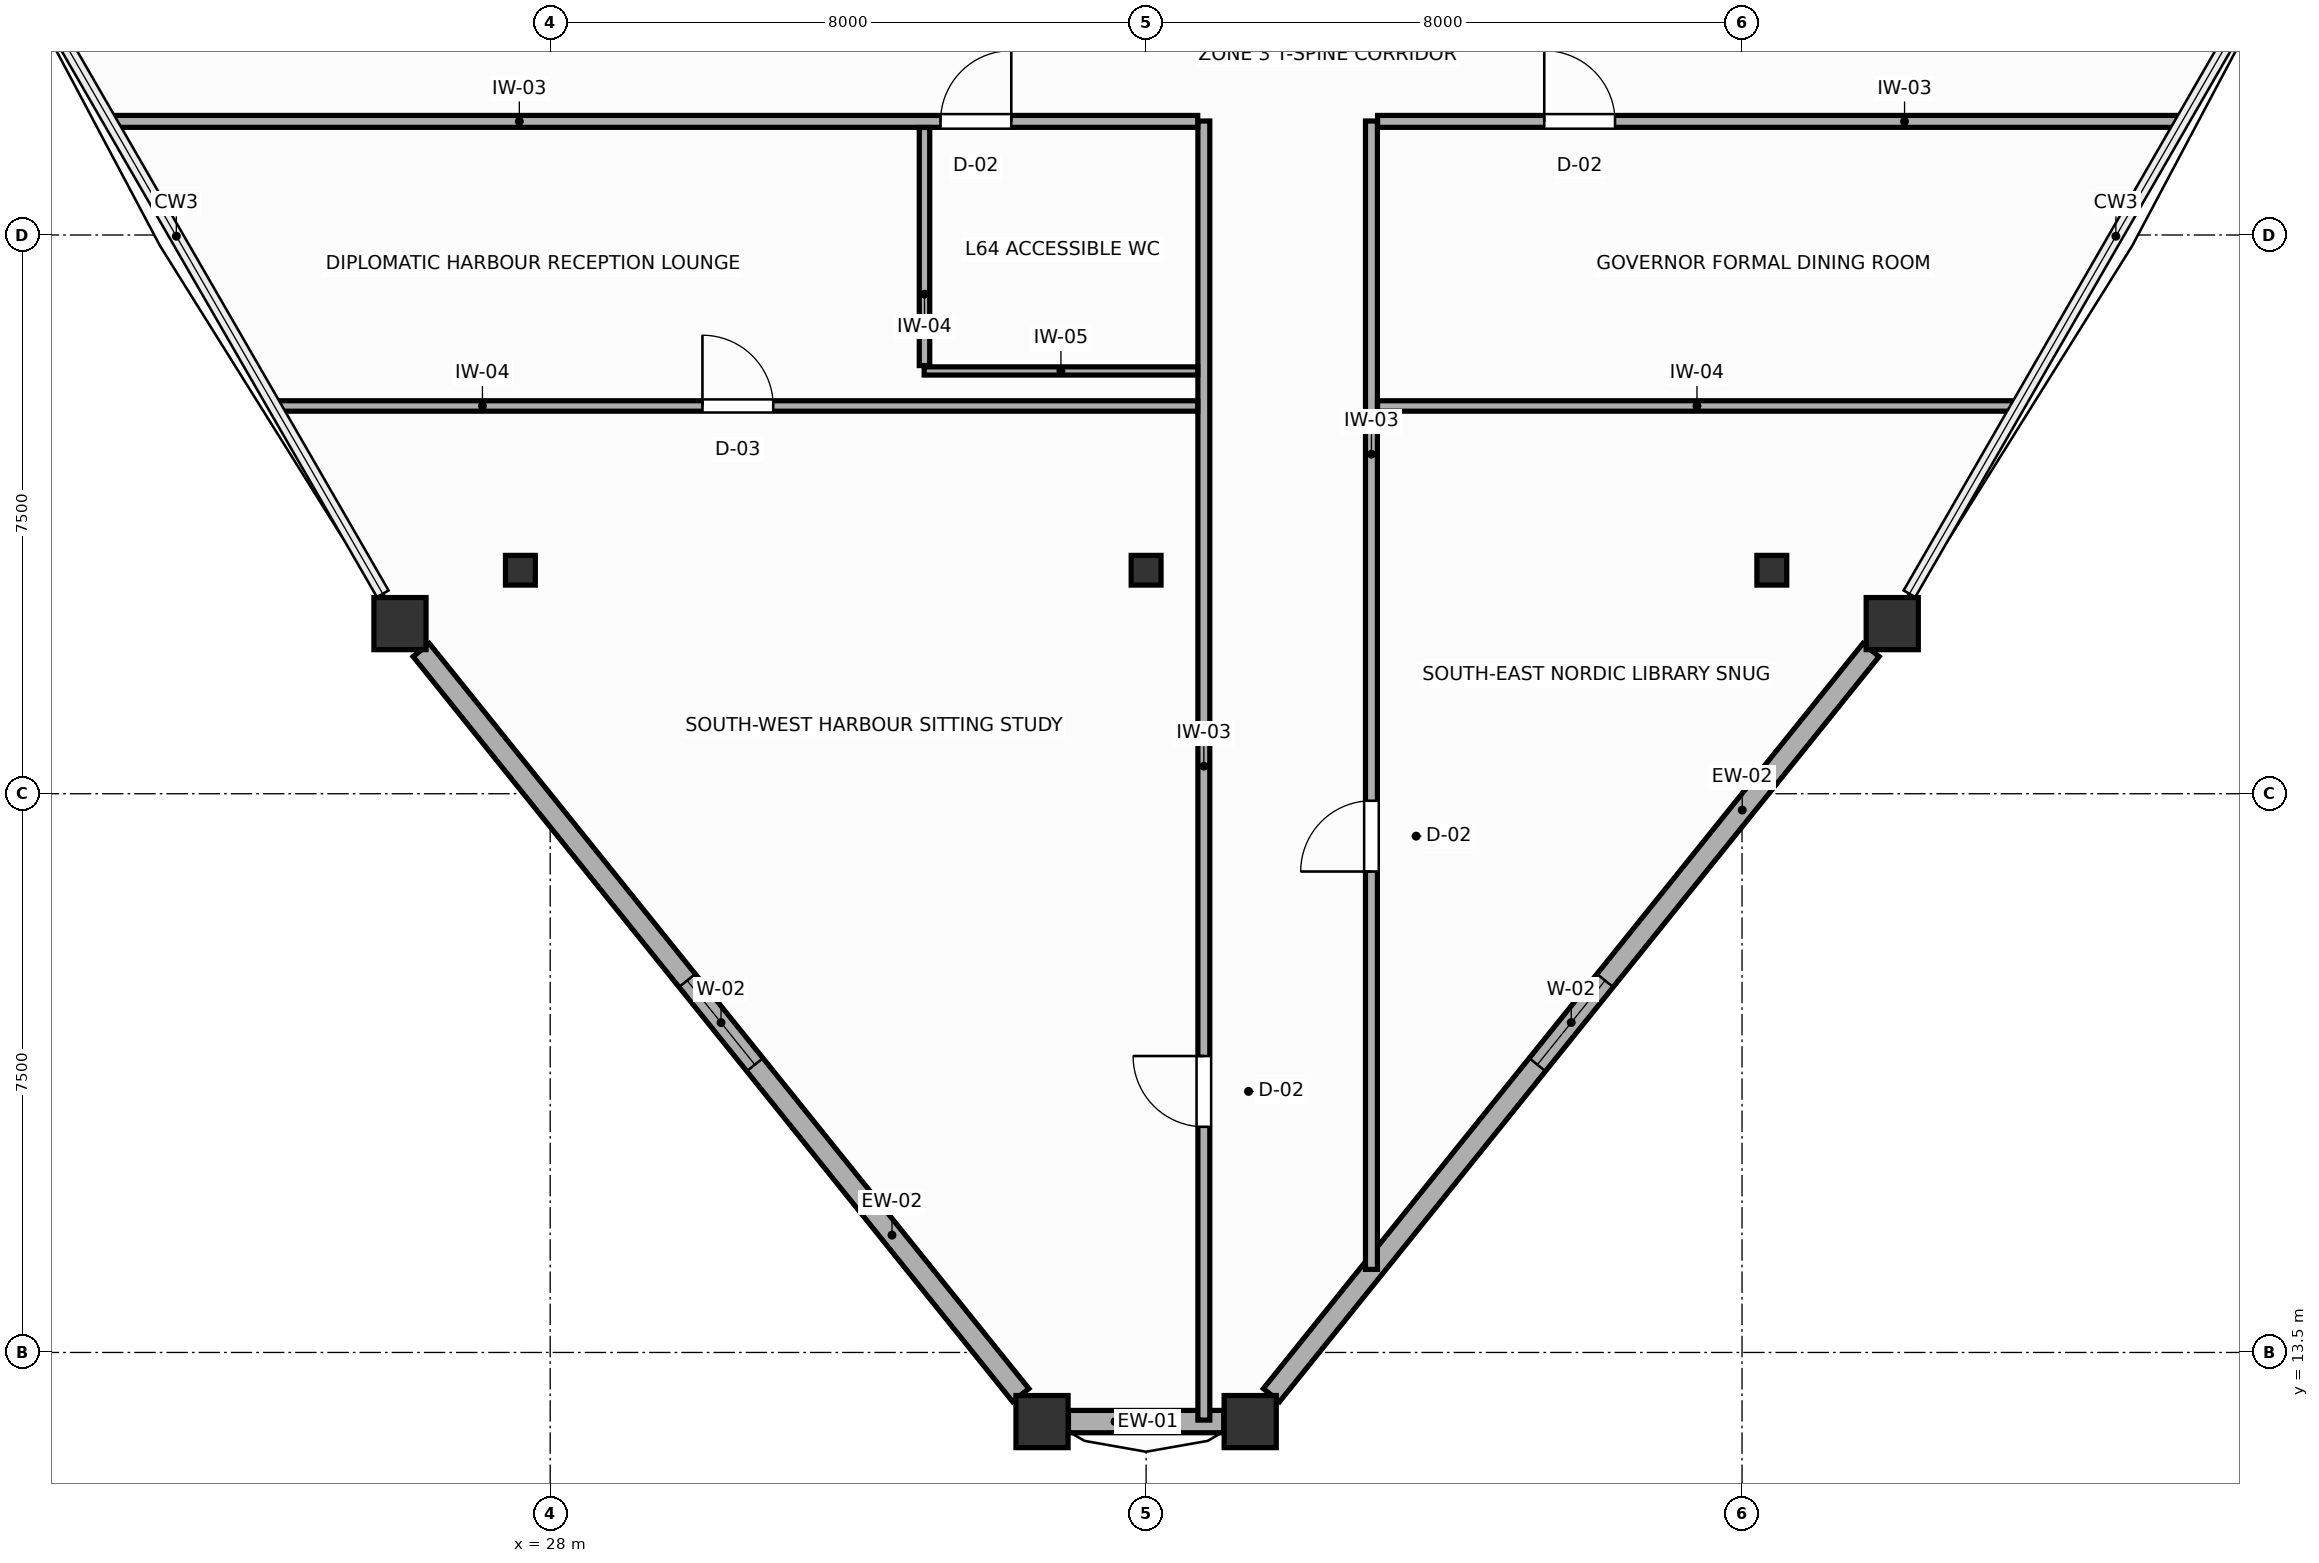
"""IFC4 building model, lengths in metres.
Left out: names, types, materials, properties, quantities, classifications, styles, units other than length and angle.
Written with IfcOpenShell. Run it as: python <this file> out.ifc"""

import sys

from ifc_helpers import new_model, si_unit, direction, frame, frame_2d, origin, origin_2d, place, context, subcontext, project, spatial, rectangle, i_section, extrude, source, transform, mapped, element, fill, save


model = new_model("IFC4")
c1 = context("Model", 3, precision=1e-05, world=origin(), true_north=direction((0.0, 1.0)))
c2 = subcontext(c1, "Body", "Model", "MODEL_VIEW")
j1 = project(units=[si_unit("LENGTHUNIT", "METRE"), si_unit("PLANEANGLEUNIT", "RADIAN")], contexts=[c1])
p1 = place(None, origin())
s1 = spatial("IfcSite", under=j1, at=p1, CompositionType="ELEMENT")
p2 = place(p1, origin())
s2 = spatial("IfcBuilding", under=s1, at=p2, CompositionType="ELEMENT")
p3 = place(p2, frame((0.0, 0.0, 246.6)))
s3 = spatial("IfcBuildingStorey", under=s2, at=p3, CompositionType="ELEMENT", Elevation=246.6)
m1 = source(origin(), c2, "Body", "SweptSolid", [
    extrude(i_section(OverallWidth=0.401, OverallDepth=0.399, WebThickness=0.022, FlangeThickness=0.036, FilletRadius=0.015, at=origin_2d()), origin(), (0.0, 0.0, 1.0), 3.6),
])
for number, where, z_axis, x_axis in (
    (1, (27.6, 24.0, 0.0), (0.0, 0.0, 1.0), (1.0, 0.0, 0.0)),
    (2, (44.4, 24.0, 0.0), (0.0, 0.0, 1.0), (1.0, 0.0, 0.0)),
    (3, (36.0, 24.0, 0.0), (0.0, 0.0, 1.0), (1.0, 0.0, 0.0)),
):
    element("IfcColumn", number, at=place(p3, frame(where, z_axis=z_axis, x_axis=x_axis)), inside=s3, PredefinedType="COLUMN", context=c2, shape_type="MappedRepresentation", body=[
        mapped(m1, transform((0.0, 0.0, 0.0), scale=1.0)),
    ])
m2 = source(origin(), c2, "Body", "SweptSolid", [
    extrude(rectangle(XDim=0.7, YDim=0.7, at=origin_2d()), origin(), (0.0, 0.0, 1.0), 3.6),
])
for number, where, z_axis, x_axis in (
    (4, (25.983, 23.284, 0.0), (0.0, 0.0, 1.0), (1.0, 0.0, 0.0)),
    (5, (34.603, 12.572, 0.0), (0.0, 0.0, 1.0), (1.0, 0.0, 0.0)),
    (6, (37.397, 12.572, 0.0), (0.0, 0.0, 1.0), (1.0, 0.0, 0.0)),
    (7, (46.017, 23.284, 0.0), (0.0, 0.0, 1.0), (1.0, 0.0, 0.0)),
):
    element("IfcColumn", number, at=place(p3, frame(where, z_axis=z_axis, x_axis=x_axis)), inside=s3, PredefinedType="COLUMN", context=c2, shape_type="MappedRepresentation", body=[
        mapped(m2, transform((0.0, 0.0, 0.0), scale=1.0)),
    ])
p4 = place(p3, frame((26.269, 22.929, 0.0), z_axis=(0.0, 0.0, 1.0), x_axis=(0.626898207352, -0.779101172903, 0.0)))
e8 = element("IfcWall", 8, at=p4, inside=s3, PredefinedType="SOLIDWALL", context=c2, shape_type="SweptSolid", body=[
    extrude(rectangle(XDim=12.837, YDim=0.28, at=frame_2d((6.418, 0.0))), origin(), (0.0, 0.0, 1.0), 3.08),
])
p5 = place(p4, frame((5.694, 0.0, 0.75)))
e9 = element("IfcOpeningElement", 9, at=p5, cuts=e8, PredefinedType="OPENING", context=c2, shape_type="SweptSolid", body=[
    extrude(rectangle(XDim=1.45, YDim=1.65, at=frame_2d((0.725, 0.825))), frame((0.0, 0.15, 0.0), z_axis=(0.0, -1.0, 0.0), x_axis=(1.0, 0.0, 0.0)), (0.0, 0.0, 1.0), 0.3),
])
p6 = place(p3, frame((34.958, 12.572, 0.0), z_axis=(0.0, 0.0, 1.0), x_axis=(1.0, 0.0, 0.0)))
e10 = element("IfcWall", 10, at=p6, inside=s3, PredefinedType="SOLIDWALL", context=c2, shape_type="SweptSolid", body=[
    extrude(rectangle(XDim=2.085, YDim=0.3, at=frame_2d((1.042, 0.0))), origin(), (0.0, 0.0, 1.0), 3.08),
])
p7 = place(p3, frame((37.683, 12.927, 0.0), z_axis=(0.0, 0.0, 1.0), x_axis=(0.626898207352, 0.779101172903, 0.0)))
e11 = element("IfcWall", 11, at=p7, inside=s3, PredefinedType="SOLIDWALL", context=c2, shape_type="SweptSolid", body=[
    extrude(rectangle(XDim=12.837, YDim=0.28, at=frame_2d((6.418, 0.0))), origin(), (0.0, 0.0, 1.0), 3.05),
])
p8 = place(p7, frame((5.694, 0.0, 0.75)))
e12 = element("IfcOpeningElement", 12, at=p8, cuts=e11, PredefinedType="OPENING", context=c2, shape_type="SweptSolid", body=[
    extrude(rectangle(XDim=1.45, YDim=1.65, at=frame_2d((0.725, 0.825))), frame((0.0, 0.15, 0.0), z_axis=(0.0, -1.0, 0.0), x_axis=(1.0, 0.0, 0.0)), (0.0, 0.0, 1.0), 0.3),
])
p9 = place(p3, frame((36.775, 12.592, 0.0), z_axis=(0.0, 0.0, 1.0), x_axis=(0.0, 1.0, 0.0)))
e13 = element("IfcWall", 13, at=p9, inside=s3, PredefinedType="PARTITIONING", context=c2, shape_type="SweptSolid", body=[
    extrude(rectangle(XDim=17.438, YDim=0.16, at=frame_2d((8.719, 0.0))), origin(), (0.0, 0.0, 1.0), 3.41),
])
p10 = place(p9, frame((3.937, 0.0, 0.0)))
e14 = element("IfcOpeningElement", 14, at=p10, cuts=e13, PredefinedType="OPENING", context=c2, shape_type="SweptSolid", body=[
    extrude(rectangle(XDim=0.95, YDim=2.05, at=frame_2d((0.475, 1.025))), frame((0.0, 0.09, 0.0), z_axis=(0.0, -1.0, 0.0), x_axis=(1.0, 0.0, 0.0)), (0.0, 0.0, 1.0), 0.18),
])
p11 = place(p3, frame((39.025, 14.615, 0.0), z_axis=(0.0, 0.0, 1.0), x_axis=(0.0, 1.0, 0.0)))
e15 = element("IfcWall", 15, at=p11, inside=s3, PredefinedType="PARTITIONING", context=c2, shape_type="SweptSolid", body=[
    extrude(rectangle(XDim=15.415, YDim=0.16, at=frame_2d((7.708, 0.0))), origin(), (0.0, 0.0, 1.0), 3.41),
])
p12 = place(p11, frame((5.341, 0.0, 0.0)))
e16 = element("IfcOpeningElement", 16, at=p12, cuts=e15, PredefinedType="OPENING", context=c2, shape_type="SweptSolid", body=[
    extrude(rectangle(XDim=0.95, YDim=2.05, at=frame_2d((0.475, 1.025))), frame((0.0, 0.09, 0.0), z_axis=(0.0, -1.0, 0.0), x_axis=(1.0, 0.0, 0.0)), (0.0, 0.0, 1.0), 0.18),
])
p13 = place(p3, frame((22.111, 30.025, 0.0), z_axis=(0.0, 0.0, 1.0), x_axis=(1.0, 0.0, 0.0)))
e17 = element("IfcWall", 17, at=p13, inside=s3, PredefinedType="PARTITIONING", context=c2, shape_type="SweptSolid", body=[
    extrude(rectangle(XDim=14.582, YDim=0.16, at=frame_2d((7.291, 0.0))), origin(), (0.0, 0.0, 1.0), 3.41),
])
p14 = place(p13, frame((11.129, 0.0, 0.0)))
e18 = element("IfcOpeningElement", 18, at=p14, cuts=e17, PredefinedType="OPENING", context=c2, shape_type="SweptSolid", body=[
    extrude(rectangle(XDim=0.95, YDim=2.05, at=frame_2d((0.475, 1.025))), frame((0.0, 0.09, 0.0), z_axis=(0.0, -1.0, 0.0), x_axis=(1.0, 0.0, 0.0)), (0.0, 0.0, 1.0), 0.18),
])
p15 = place(p3, frame((39.107, 30.025, 0.0), z_axis=(0.0, 0.0, 1.0), x_axis=(1.0, 0.0, 0.0)))
e19 = element("IfcWall", 19, at=p15, inside=s3, PredefinedType="PARTITIONING", context=c2, shape_type="SweptSolid", body=[
    extrude(rectangle(XDim=10.782, YDim=0.16, at=frame_2d((5.391, 0.0))), origin(), (0.0, 0.0, 1.0), 3.41),
])
p16 = place(p15, frame((2.238, 0.0, 0.0)))
e20 = element("IfcOpeningElement", 20, at=p16, cuts=e19, PredefinedType="OPENING", context=c2, shape_type="SweptSolid", body=[
    extrude(rectangle(XDim=0.95, YDim=2.05, at=frame_2d((0.475, 1.025))), frame((0.0, 0.09, 0.0), z_axis=(0.0, -1.0, 0.0), x_axis=(1.0, 0.0, 0.0)), (0.0, 0.0, 1.0), 0.18),
])
p17 = place(p3, frame((24.317, 26.205, 0.0), z_axis=(0.0, 0.0, 1.0), x_axis=(1.0, 0.0, 0.0)))
e21 = element("IfcWall", 21, at=p17, inside=s3, PredefinedType="PARTITIONING", context=c2, shape_type="SweptSolid", body=[
    extrude(rectangle(XDim=12.376, YDim=0.14, at=frame_2d((6.188, 0.0))), origin(), (0.0, 0.0, 1.0), 3.41),
])
p18 = place(p17, frame((5.727, 0.0, 0.0)))
e22 = element("IfcOpeningElement", 22, at=p18, cuts=e21, PredefinedType="OPENING", context=c2, shape_type="SweptSolid", body=[
    extrude(rectangle(XDim=0.95, YDim=2.05, at=frame_2d((0.475, 1.025))), frame((0.0, 0.08, 0.0), z_axis=(0.0, -1.0, 0.0), x_axis=(1.0, 0.0, 0.0)), (0.0, 0.0, 1.0), 0.16),
])
p19 = place(p3, frame((39.107, 26.205, 0.0), z_axis=(0.0, 0.0, 1.0), x_axis=(1.0, 0.0, 0.0)))
e23 = element("IfcWall", 23, at=p19, inside=s3, PredefinedType="PARTITIONING", context=c2, shape_type="SweptSolid", body=[
    extrude(rectangle(XDim=8.576, YDim=0.14, at=frame_2d((4.288, 0.0))), origin(), (0.0, 0.0, 1.0), 3.41),
])
p20 = place(p3, frame((33.02, 26.675, 0.0), z_axis=(0.0, 0.0, 1.0), x_axis=(1.0, 0.0, 0.0)))
e24 = element("IfcWall", 24, at=p20, inside=s3, PredefinedType="MOVABLE", context=c2, shape_type="SweptSolid", body=[
    extrude(rectangle(XDim=3.673, YDim=0.11, at=frame_2d((1.836, 0.0))), origin(), (0.0, 0.0, 1.0), 3.41),
])
p21 = place(p3, frame((33.025, 26.747, 0.0), z_axis=(0.0, 0.0, 1.0), x_axis=(0.0, 1.0, 0.0)))
e25 = element("IfcWall", 25, at=p21, inside=s3, PredefinedType="PARTITIONING", context=c2, shape_type="SweptSolid", body=[
    extrude(rectangle(XDim=3.196, YDim=0.14, at=frame_2d((1.598, 0.0))), origin(), (0.0, 0.0, 1.0), 3.41),
])
p22 = place(p5, origin())
e26 = element("IfcWindow", 26, at=p22, inside=s3, PartitioningType="SINGLE_PANEL", PredefinedType="WINDOW", context=c2, shape_type="SweptSolid", body=[
    extrude(rectangle(XDim=1.45, YDim=1.65, at=frame_2d((0.725, 0.825))), frame((0.0, 0.03, 0.0), z_axis=(0.0, -1.0, 0.0), x_axis=(1.0, 0.0, 0.0)), (0.0, 0.0, 1.0), 0.06),
])
fill(e9, e26)
p23 = place(p8, origin())
e27 = element("IfcWindow", 27, at=p23, inside=s3, PartitioningType="SINGLE_PANEL", PredefinedType="WINDOW", context=c2, shape_type="SweptSolid", body=[
    extrude(rectangle(XDim=1.45, YDim=1.65, at=frame_2d((0.725, 0.825))), frame((0.0, 0.03, 0.0), z_axis=(0.0, -1.0, 0.0), x_axis=(1.0, 0.0, 0.0)), (0.0, 0.0, 1.0), 0.06),
])
fill(e12, e27)
p24 = place(p10, origin())
e28 = element("IfcDoor", 28, at=p24, inside=s3, OperationType="SINGLE_SWING_RIGHT", PredefinedType="DOOR", context=c2, shape_type="SweptSolid", body=[
    extrude(rectangle(XDim=0.95, YDim=2.05, at=frame_2d((0.475, 1.025))), frame((0.0, 0.025, 0.0), z_axis=(0.0, -1.0, 0.0), x_axis=(1.0, 0.0, 0.0)), (0.0, 0.0, 1.0), 0.05),
])
fill(e14, e28)
p25 = place(p12, origin())
e29 = element("IfcDoor", 29, at=p25, inside=s3, OperationType="SINGLE_SWING_LEFT", PredefinedType="DOOR", context=c2, shape_type="SweptSolid", body=[
    extrude(rectangle(XDim=0.95, YDim=2.05, at=frame_2d((0.475, 1.025))), frame((0.0, 0.025, 0.0), z_axis=(0.0, -1.0, 0.0), x_axis=(1.0, 0.0, 0.0)), (0.0, 0.0, 1.0), 0.05),
])
fill(e16, e29)
p26 = place(p14, origin())
e30 = element("IfcDoor", 30, at=p26, inside=s3, OperationType="SINGLE_SWING_RIGHT", PredefinedType="DOOR", context=c2, shape_type="SweptSolid", body=[
    extrude(rectangle(XDim=0.95, YDim=2.05, at=frame_2d((0.475, 1.025))), frame((0.0, 0.025, 0.0), z_axis=(0.0, -1.0, 0.0), x_axis=(1.0, 0.0, 0.0)), (0.0, 0.0, 1.0), 0.05),
])
fill(e18, e30)
p27 = place(p16, origin())
e31 = element("IfcDoor", 31, at=p27, inside=s3, OperationType="SINGLE_SWING_LEFT", PredefinedType="DOOR", context=c2, shape_type="SweptSolid", body=[
    extrude(rectangle(XDim=0.95, YDim=2.05, at=frame_2d((0.475, 1.025))), frame((0.0, 0.025, 0.0), z_axis=(0.0, -1.0, 0.0), x_axis=(1.0, 0.0, 0.0)), (0.0, 0.0, 1.0), 0.05),
])
fill(e20, e31)
p28 = place(p18, origin())
e32 = element("IfcDoor", 32, at=p28, inside=s3, OperationType="SINGLE_SWING_LEFT", PredefinedType="DOOR", context=c2, shape_type="SweptSolid", body=[
    extrude(rectangle(XDim=0.95, YDim=2.05, at=frame_2d((0.475, 1.025))), frame((0.0, 0.025, 0.0), z_axis=(0.0, -1.0, 0.0), x_axis=(1.0, 0.0, 0.0)), (0.0, 0.0, 1.0), 0.05),
])
fill(e22, e32)
save(model, sys.argv[1])
